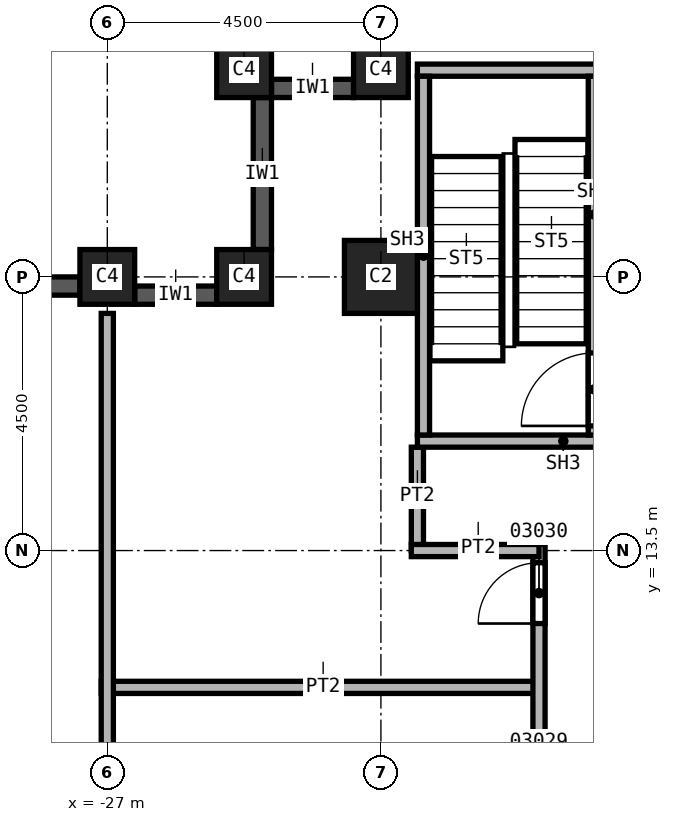
"""IFC4 building model, lengths in metres.
Left out: names, types, materials, properties, quantities, classifications, styles, units other than length and angle.
Written with IfcOpenShell. Run it as: python <this file> out.ifc"""

import sys

from ifc_helpers import new_model, si_unit, direction, frame, frame_2d, origin, origin_2d, place, context, subcontext, project, spatial, rectangle, extrude, element, fill, save


model = new_model("IFC4")
c1 = context("Model", 3, precision=1e-05, world=origin(), true_north=direction((0.0, 1.0)))
c2 = subcontext(c1, "Body", "Model", "MODEL_VIEW")
j1 = project(units=[si_unit("LENGTHUNIT", "METRE"), si_unit("PLANEANGLEUNIT", "RADIAN")], contexts=[c1])
p1 = place(None, origin())
s1 = spatial("IfcSite", under=j1, at=p1, CompositionType="ELEMENT")
p2 = place(p1, origin())
s2 = spatial("IfcBuilding", under=s1, at=p2, CompositionType="ELEMENT")
p3 = place(p2, frame((0.0, 0.0, 92.0)))
s3 = spatial("IfcBuildingStorey", under=s2, at=p3, CompositionType="ELEMENT", Elevation=92.0)
p4 = place(p3, frame((-22.5, 18.0, 0.0), z_axis=(0.0, 0.0, 1.0), x_axis=(1.0, 0.0, 0.0)))
e1 = element("IfcColumn", 1, at=p4, inside=s3, PredefinedType="COLUMN", context=c2, shape_type="SweptSolid", body=[
    extrude(rectangle(XDim=1.2, YDim=1.2, at=origin_2d()), origin(), (0.0, 0.0, 1.0), 3.7),
])
for number, where, z_axis, x_axis in (
    (2, (-27.0, 18.0, 0.0), (0.0, 0.0, 1.0), (1.0, 0.0, 0.0)),
    (3, (-22.5, 21.4, 0.0), (0.0, 0.0, 1.0), (1.0, 0.0, 0.0)),
    (4, (-24.75, 21.4, 0.0), (0.0, 0.0, 1.0), (1.0, 0.0, 0.0)),
    (5, (-24.75, 18.0, 0.0), (0.0, 0.0, 1.0), (1.0, 0.0, 0.0)),
):
    element("IfcColumn", number, at=place(p3, frame(where, z_axis=z_axis, x_axis=x_axis)), inside=s3, PredefinedType="COLUMN", context=c2, shape_type="SweptSolid", body=[
        extrude(rectangle(XDim=0.9, YDim=0.9, at=origin_2d()), origin(), (0.0, 0.0, 1.0), 3.7),
    ])
p5 = place(p3, frame((-22.95, 21.1, 0.0), z_axis=(0.0, 0.0, 1.0), x_axis=(-1.0, 0.0, 0.0)))
e6 = element("IfcWall", 6, at=p5, inside=s3, PredefinedType="SOLIDWALL", context=c2, shape_type="SweptSolid", body=[
    extrude(rectangle(XDim=1.35, YDim=0.3, at=frame_2d((0.675, 0.0))), origin(), (0.0, 0.0, 1.0), 3.1),
])
p6 = place(p3, frame((-24.45, 20.95, 0.0), z_axis=(0.0, 0.0, 1.0), x_axis=(0.0, -1.0, 0.0)))
e7 = element("IfcWall", 7, at=p6, inside=s3, PredefinedType="SOLIDWALL", context=c2, shape_type="SweptSolid", body=[
    extrude(rectangle(XDim=2.5, YDim=0.3, at=frame_2d((1.25, 0.0))), origin(), (0.0, 0.0, 1.0), 3.1),
])
p7 = place(p3, frame((-25.2, 17.7, 0.0), z_axis=(0.0, 0.0, 1.0), x_axis=(-1.0, 0.0, 0.0)))
e8 = element("IfcWall", 8, at=p7, inside=s3, PredefinedType="SOLIDWALL", context=c2, shape_type="SweptSolid", body=[
    extrude(rectangle(XDim=1.35, YDim=0.3, at=frame_2d((0.675, 0.0))), origin(), (0.0, 0.0, 1.0), 3.1),
])
p8 = place(p3, frame((-27.45, 17.85, 0.0), z_axis=(0.0, 0.0, 1.0), x_axis=(-1.0, 0.0, 0.0)))
e9 = element("IfcWall", 9, at=p8, inside=s3, PredefinedType="SOLIDWALL", context=c2, shape_type="SweptSolid", body=[
    extrude(rectangle(XDim=3.6, YDim=0.3, at=frame_2d((1.8, 0.0))), origin(), (0.0, 0.0, 1.0), 3.1),
])
p9 = place(p8, frame((0.6, 0.0, 0.8)))
e10 = element("IfcOpeningElement", 10, at=p9, cuts=e9, PredefinedType="OPENING", context=c2, shape_type="SweptSolid", body=[
    extrude(rectangle(XDim=2.4, YDim=1.95, at=frame_2d((1.2, 0.975))), frame((0.0, 0.15, 0.0), z_axis=(0.0, -1.0, 0.0), x_axis=(1.0, 0.0, 0.0)), (0.0, 0.0, 1.0), 0.3),
])
p10 = place(p3, frame((-27.1, 11.25, 0.0), z_axis=(0.0, 0.0, 1.0), x_axis=(1.0, 0.0, 0.0)))
e11 = element("IfcWall", 11, at=p10, inside=s3, PredefinedType="PARTITIONING", context=c2, shape_type="SweptSolid", body=[
    extrude(rectangle(XDim=7.2, YDim=0.2, at=frame_2d((3.6, 0.0))), origin(), (0.0, 0.0, 1.0), 3.7),
])
p11 = place(p3, frame((-27.0, 3.75, 0.0), z_axis=(0.0, 0.0, 1.0), x_axis=(0.0, 1.0, 0.0)))
e12 = element("IfcWall", 12, at=p11, inside=s3, PredefinedType="PARTITIONING", context=c2, shape_type="SweptSolid", body=[
    extrude(rectangle(XDim=13.65, YDim=0.2, at=frame_2d((6.825, 0.0))), origin(), (0.0, 0.0, 1.0), 3.7),
])
p12 = place(p3, frame((-21.9, 13.5, 0.0), z_axis=(0.0, 0.0, 1.0), x_axis=(0.0, 1.0, 0.0)))
e13 = element("IfcWall", 13, at=p12, inside=s3, PredefinedType="PARTITIONING", context=c2, shape_type="SweptSolid", body=[
    extrude(rectangle(XDim=1.7, YDim=0.2, at=frame_2d((0.85, 0.0))), origin(), (0.0, 0.0, 1.0), 3.7),
])
p13 = place(p3, frame((-19.9, 3.65, 0.0), z_axis=(0.0, 0.0, 1.0), x_axis=(0.0, 1.0, 0.0)))
e14 = element("IfcWall", 14, at=p13, inside=s3, PredefinedType="PARTITIONING", context=c2, shape_type="SweptSolid", body=[
    extrude(rectangle(XDim=9.95, YDim=0.2, at=frame_2d((4.975, 0.0))), origin(), (0.0, 0.0, 1.0), 3.7),
])
p14 = place(p13, frame((5.2, 0.0, 0.0)))
e15 = element("IfcOpeningElement", 15, at=p14, cuts=e14, PredefinedType="OPENING", context=c2, shape_type="SweptSolid", body=[
    extrude(rectangle(XDim=1.0, YDim=2.1, at=frame_2d((0.5, 1.05))), frame((0.0, 0.1, 0.0), z_axis=(0.0, -1.0, 0.0), x_axis=(1.0, 0.0, 0.0)), (0.0, 0.0, 1.0), 0.2),
])
p15 = place(p13, frame((8.65, 0.0, 0.0)))
e16 = element("IfcOpeningElement", 16, at=p15, cuts=e14, PredefinedType="OPENING", context=c2, shape_type="SweptSolid", body=[
    extrude(rectangle(XDim=1.0, YDim=2.1, at=frame_2d((0.5, 1.05))), frame((0.0, 0.1, 0.0), z_axis=(0.0, -1.0, 0.0), x_axis=(1.0, 0.0, 0.0)), (0.0, 0.0, 1.0), 0.2),
])
p16 = place(p3, frame((-19.9, 13.5, 0.0), z_axis=(0.0, 0.0, 1.0), x_axis=(-1.0, 0.0, 0.0)))
e17 = element("IfcWall", 17, at=p16, inside=s3, PredefinedType="PARTITIONING", context=c2, shape_type="SweptSolid", body=[
    extrude(rectangle(XDim=2.1, YDim=0.2, at=frame_2d((1.05, 0.0))), origin(), (0.0, 0.0, 1.0), 3.7),
])
p17 = place(p3, frame((-21.9, 15.3, 0.0), z_axis=(0.0, 0.0, 1.0), x_axis=(1.0, 0.0, 0.0)))
e18 = element("IfcWall", 18, at=p17, inside=s3, PredefinedType="SOLIDWALL", context=c2, shape_type="SweptSolid", body=[
    extrude(rectangle(XDim=8.275, YDim=0.2, at=frame_2d((4.137, 0.0))), origin(), (0.0, 0.0, 1.0), 3.7),
])
p18 = place(p17, frame((4.8, 0.0, 0.0)))
e19 = element("IfcOpeningElement", 19, at=p18, cuts=e18, PredefinedType="OPENING", context=c2, shape_type="SweptSolid", body=[
    extrude(rectangle(XDim=1.2, YDim=2.1, at=frame_2d((0.6, 1.05))), frame((0.0, 0.1, 0.0), z_axis=(0.0, -1.0, 0.0), x_axis=(1.0, 0.0, 0.0)), (0.0, 0.0, 1.0), 0.2),
])
p19 = place(p3, frame((-21.9, 21.4, 0.0), z_axis=(0.0, 0.0, 1.0), x_axis=(1.0, 0.0, 0.0)))
e20 = element("IfcWall", 20, at=p19, inside=s3, PredefinedType="SOLIDWALL", context=c2, shape_type="SweptSolid", body=[
    extrude(rectangle(XDim=7.8, YDim=0.2, at=frame_2d((3.9, 0.0))), origin(), (0.0, 0.0, 1.0), 3.7),
])
p20 = place(p19, frame((3.2, 0.0, 0.0)))
e21 = element("IfcOpeningElement", 21, at=p20, cuts=e20, PredefinedType="OPENING", context=c2, shape_type="SweptSolid", body=[
    extrude(rectangle(XDim=1.2, YDim=2.1, at=frame_2d((0.6, 1.05))), frame((0.0, 0.1, 0.0), z_axis=(0.0, -1.0, 0.0), x_axis=(1.0, 0.0, 0.0)), (0.0, 0.0, 1.0), 0.2),
])
p21 = place(p3, frame((-21.8, 15.4, 0.0), z_axis=(0.0, 0.0, 1.0), x_axis=(0.0, 1.0, 0.0)))
e22 = element("IfcWall", 22, at=p21, inside=s3, PredefinedType="SOLIDWALL", context=c2, shape_type="SweptSolid", body=[
    extrude(rectangle(XDim=5.9, YDim=0.2, at=frame_2d((2.95, 0.0))), origin(), (0.0, 0.0, 1.0), 3.7),
])
p22 = place(p3, frame((-18.99, 15.4, 0.0), z_axis=(0.0, 0.0, 1.0), x_axis=(0.0, 1.0, 0.0)))
e23 = element("IfcWall", 23, at=p22, inside=s3, PredefinedType="SOLIDWALL", context=c2, shape_type="SweptSolid", body=[
    extrude(rectangle(XDim=5.9, YDim=0.2, at=frame_2d((2.95, 0.0))), origin(), (0.0, 0.0, 1.0), 3.7),
])
p23 = place(p22, frame((0.15, 0.0, 0.0)))
e24 = element("IfcOpeningElement", 24, at=p23, cuts=e23, PredefinedType="OPENING", context=c2, shape_type="SweptSolid", body=[
    extrude(rectangle(XDim=1.2, YDim=2.1, at=frame_2d((0.6, 1.05))), frame((0.0, 0.1, 0.0), z_axis=(0.0, -1.0, 0.0), x_axis=(1.0, 0.0, 0.0)), (0.0, 0.0, 1.0), 0.2),
])
p24 = place(p15, origin())
e25 = element("IfcDoor", 25, at=p24, inside=s3, OperationType="SINGLE_SWING_LEFT", PredefinedType="DOOR", context=c2, shape_type="SweptSolid", body=[
    extrude(rectangle(XDim=1.0, YDim=2.1, at=frame_2d((0.5, 1.05))), frame((0.0, 0.025, 0.0), z_axis=(0.0, -1.0, 0.0), x_axis=(1.0, 0.0, 0.0)), (0.0, 0.0, 1.0), 0.05),
])
fill(e16, e25)
p25 = place(p23, origin())
e26 = element("IfcDoor", 26, at=p25, inside=s3, OperationType="SINGLE_SWING_LEFT", PredefinedType="DOOR", context=c2, shape_type="SweptSolid", body=[
    extrude(rectangle(XDim=1.2, YDim=2.1, at=frame_2d((0.6, 1.05))), frame((0.0, 0.025, 0.0), z_axis=(0.0, -1.0, 0.0), x_axis=(1.0, 0.0, 0.0)), (0.0, 0.0, 1.0), 0.05),
])
fill(e24, e26)
save(model, sys.argv[1])
